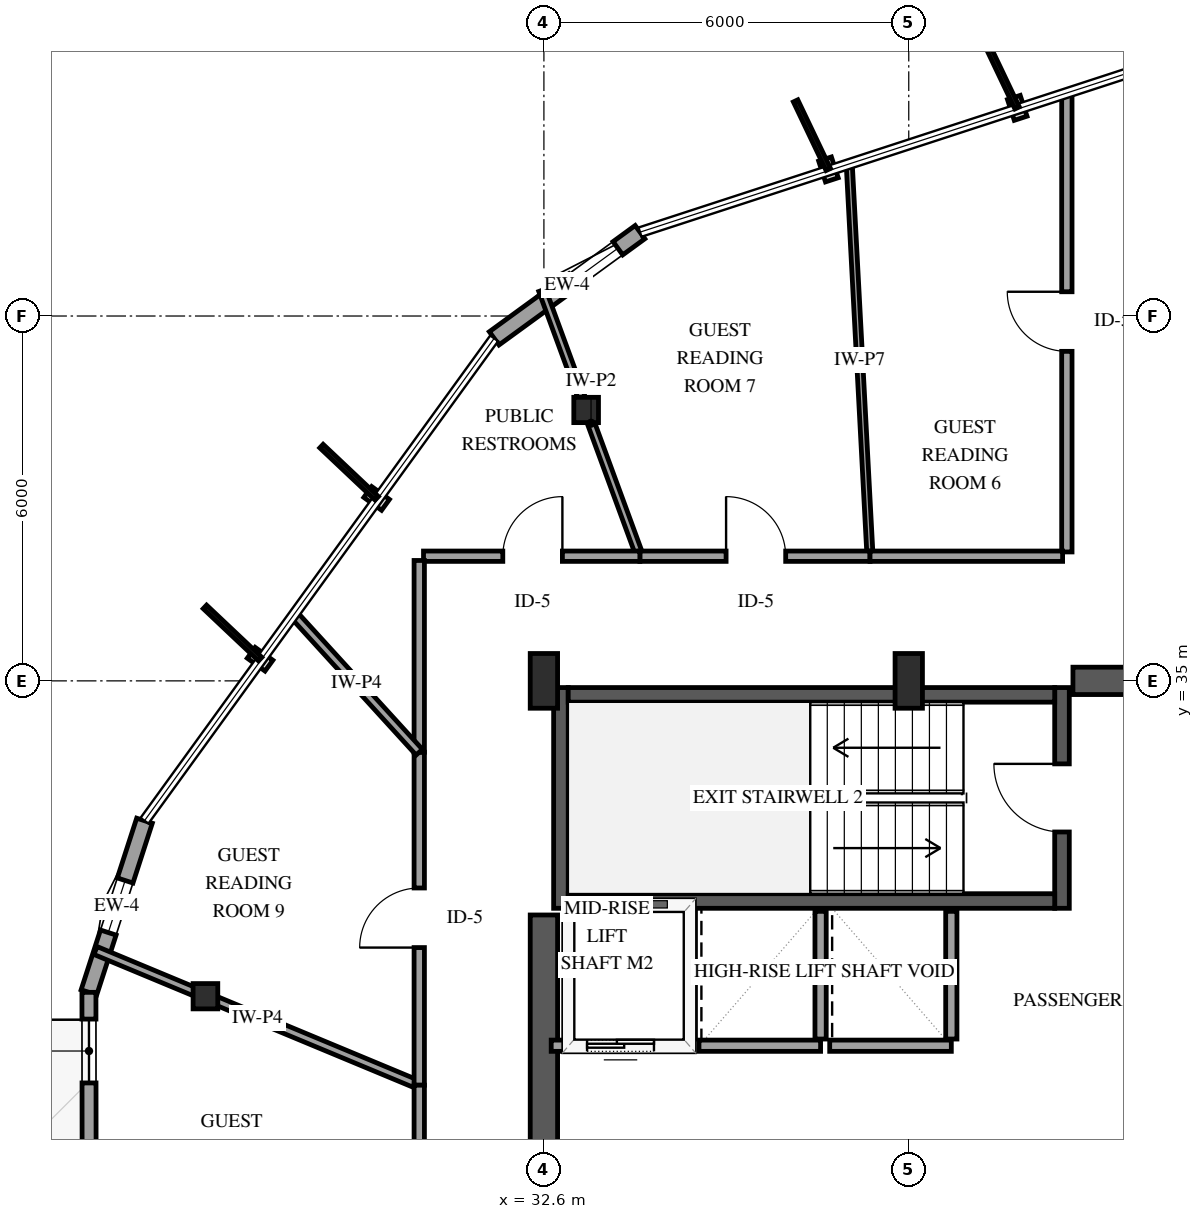
"""IFC4 building model, lengths in metres.
Left out: names, types, materials, properties, quantities, classifications, styles, units other than length and angle.
Written with IfcOpenShell. Run it as: python <this file> out.ifc"""

import sys

from ifc_helpers import new_model, si_unit, direction, frame, frame_2d, origin, origin_2d, place, context, subcontext, project, spatial, rectangle, i_section, extrude, element, fill, save


model = new_model("IFC4")
c1 = context("Model", 3, precision=1e-05, world=origin(), true_north=direction((0.0, 1.0)))
c2 = subcontext(c1, "Body", "Model", "MODEL_VIEW")
j1 = project(units=[si_unit("LENGTHUNIT", "METRE"), si_unit("PLANEANGLEUNIT", "RADIAN")], contexts=[c1])
p1 = place(None, origin())
s1 = spatial("IfcSite", under=j1, at=p1, CompositionType="ELEMENT")
p2 = place(p1, origin())
s2 = spatial("IfcBuilding", under=s1, at=p2, CompositionType="ELEMENT")
p3 = place(p2, frame((0.0, 0.0, 230.2)))
s3 = spatial("IfcBuildingStorey", under=s2, at=p3, CompositionType="ELEMENT", Elevation=230.2)
p4 = place(p3, frame((32.88, 31.26, 0.0), z_axis=(0.0, 0.0, 1.0), x_axis=(0.0, 1.0, 0.0)))
e1 = element("IfcWall", 1, at=p4, inside=s3, PredefinedType="SHEAR", context=c2, shape_type="SweptSolid", body=[
    extrude(rectangle(XDim=3.63, YDim=0.24, at=frame_2d((1.815, 0.0))), origin(), (0.0, 0.0, 1.0), 3.6),
])
p5 = place(p3, frame((41.12, 31.26, 0.0), z_axis=(0.0, 0.0, 1.0), x_axis=(0.0, 1.0, 0.0)))
e2 = element("IfcWall", 2, at=p5, inside=s3, PredefinedType="SHEAR", context=c2, shape_type="SweptSolid", body=[
    extrude(rectangle(XDim=3.63, YDim=0.24, at=frame_2d((1.815, 0.0))), origin(), (0.0, 0.0, 1.0), 3.6),
])
p6 = place(p5, frame((1.255, 0.0, 0.0)))
e3 = element("IfcOpeningElement", 3, at=p6, cuts=e2, PredefinedType="OPENING", context=c2, shape_type="SweptSolid", body=[
    extrude(rectangle(XDim=1.12, YDim=2.15, at=frame_2d((0.56, 1.075))), frame((0.0, 0.13, 0.0), z_axis=(0.0, -1.0, 0.0), x_axis=(1.0, 0.0, 0.0)), (0.0, 0.0, 1.0), 0.26),
])
for number, where, z_axis, x_axis in (
    (4, (33.0, 31.38, 0.0), (0.0, 0.0, 1.0), (1.0, 0.0, 0.0)),
    (5, (33.0, 34.77, 0.0), (0.0, 0.0, 1.0), (1.0, 0.0, 0.0)),
):
    element("IfcWall", number, at=place(p3, frame(where, z_axis=z_axis, x_axis=x_axis)), inside=s3, PredefinedType="SHEAR", context=c2, shape_type="SweptSolid", body=[
        extrude(rectangle(XDim=8.0, YDim=0.24, at=frame_2d((4.0, 0.0))), origin(), (0.0, 0.0, 1.0), 3.6),
    ])
p7 = place(p3, frame((32.6, 18.85, 0.0), z_axis=(0.0, 0.0, 1.0), x_axis=(0.0, 1.0, 0.0)))
e6 = element("IfcWall", 6, at=p7, inside=s3, PredefinedType="SHEAR", context=c2, shape_type="SweptSolid", body=[
    extrude(rectangle(XDim=12.3, YDim=0.45, at=frame_2d((6.15, 0.0))), origin(), (0.0, 0.0, 1.0), 3.6),
])
p8 = place(p3, frame((41.3, 35.0, 0.0), z_axis=(0.0, 0.0, 1.0), x_axis=(1.0, 0.0, 0.0)))
e7 = element("IfcWall", 7, at=p8, inside=s3, PredefinedType="SHEAR", context=c2, shape_type="SweptSolid", body=[
    extrude(rectangle(XDim=2.85, YDim=0.45, at=frame_2d((1.425, 0.0))), origin(), (0.0, 0.0, 1.0), 3.6),
])
for number, where, z_axis, x_axis in (
    (8, (32.6, 35.0, 0.0), (0.0, 0.0, 1.0), (1.0, 0.0, 0.0)),
    (9, (38.6, 35.0, 0.0), (0.0, 0.0, 1.0), (1.0, 0.0, 0.0)),
):
    element("IfcColumn", number, at=place(p3, frame(where, z_axis=z_axis, x_axis=x_axis)), inside=s3, PredefinedType="PILASTER", context=c2, shape_type="SweptSolid", body=[
        extrude(rectangle(XDim=0.45, YDim=0.9, at=origin_2d()), origin(), (0.0, 0.0, 1.0), 3.6),
    ])
for number, where, z_axis, x_axis in (
    (10, (33.295, 39.455, 0.0), (0.0, 0.0, 1.0), (1.0, 0.0, 0.0)),
    (11, (27.034, 29.814, 0.0), (0.0, 0.0, 1.0), (1.0, 0.0, 0.0)),
):
    element("IfcColumn", number, at=place(p3, frame(where, z_axis=z_axis, x_axis=x_axis)), inside=s3, PredefinedType="COLUMN", context=c2, shape_type="SweptSolid", body=[
        extrude(i_section(OverallWidth=0.406, OverallDepth=0.416, WebThickness=0.03, FlangeThickness=0.048, FilletRadius=0.038, at=origin_2d()), origin(), (0.0, 0.0, 1.0), 3.6),
    ])
p9 = place(p3, frame((34.18, 42.379, 0.0), z_axis=(0.0, 0.0, 1.0), x_axis=(-0.808383627719, -0.58865602047, 0.0)))
e12 = element("IfcWall", 12, at=p9, inside=s3, PredefinedType="SOLIDWALL", context=c2, shape_type="SweptSolid", body=[
    extrude(rectangle(XDim=2.967, YDim=0.27, at=frame_2d((1.483, 0.0))), origin(), (0.0, 0.0, 1.0), 2.679),
])
p10 = place(p9, frame((0.45, 0.0, 0.75)))
e13 = element("IfcOpeningElement", 13, at=p10, cuts=e12, PredefinedType="OPENING", context=c2, shape_type="SweptSolid", body=[
    extrude(rectangle(XDim=0.9, YDim=1.5, at=frame_2d((0.45, 0.75))), frame((0.0, 0.145, 0.0), z_axis=(0.0, -1.0, 0.0), x_axis=(1.0, 0.0, 0.0)), (0.0, 0.0, 1.0), 0.29),
])
p11 = place(p3, frame((26.031, 32.7, 0.0), z_axis=(0.0, 0.0, 1.0), x_axis=(-0.307945174151, -0.95140410432, 0.0)))
e14 = element("IfcWall", 14, at=p11, inside=s3, PredefinedType="SOLIDWALL", context=c2, shape_type="SweptSolid", body=[
    extrude(rectangle(XDim=2.967, YDim=0.27, at=frame_2d((1.483, 0.0))), origin(), (0.0, 0.0, 1.0), 2.679),
])
p12 = place(p11, frame((1.033, 0.0, 0.75)))
e15 = element("IfcOpeningElement", 15, at=p12, cuts=e14, PredefinedType="OPENING", context=c2, shape_type="SweptSolid", body=[
    extrude(rectangle(XDim=0.9, YDim=1.5, at=frame_2d((0.45, 0.75))), frame((0.0, 0.145, 0.0), z_axis=(0.0, -1.0, 0.0), x_axis=(1.0, 0.0, 0.0)), (0.0, 0.0, 1.0), 0.29),
])
p13 = place(p3, frame((25.118, 29.878, 0.0), z_axis=(0.0, 0.0, 1.0), x_axis=(0.001046571902, -0.999999452343, 0.0)))
e16 = element("IfcWall", 16, at=p13, inside=s3, PredefinedType="SOLIDWALL", context=c2, shape_type="SweptSolid", body=[
    extrude(rectangle(XDim=9.798, YDim=0.23, at=frame_2d((4.899, 0.0))), origin(), (0.0, 0.0, 1.0), 2.679),
])
p14 = place(p13, frame((4.399, 0.0, 0.0)))
e17 = element("IfcOpeningElement", 17, at=p14, cuts=e16, PredefinedType="OPENING", context=c2, shape_type="SweptSolid", body=[
    extrude(rectangle(XDim=1.0, YDim=2.15, at=frame_2d((0.5, 1.075))), frame((0.0, 0.125, 0.0), z_axis=(0.0, -1.0, 0.0), x_axis=(1.0, 0.0, 0.0)), (0.0, 0.0, 1.0), 0.25),
])
p15 = place(p13, frame((0.44, 0.0, 0.72)))
e18 = element("IfcOpeningElement", 18, at=p15, cuts=e16, PredefinedType="OPENING", context=c2, shape_type="SweptSolid", body=[
    extrude(rectangle(XDim=1.05, YDim=1.55, at=frame_2d((0.525, 0.775))), frame((0.0, 0.125, 0.0), z_axis=(0.0, -1.0, 0.0), x_axis=(1.0, 0.0, 0.0)), (0.0, 0.0, 1.0), 0.25),
])
p16 = place(p13, frame((6.606, 0.0, 0.72)))
e19 = element("IfcOpeningElement", 19, at=p16, cuts=e16, PredefinedType="OPENING", context=c2, shape_type="SweptSolid", body=[
    extrude(rectangle(XDim=1.05, YDim=1.55, at=frame_2d((0.525, 0.775))), frame((0.0, 0.125, 0.0), z_axis=(0.0, -1.0, 0.0), x_axis=(1.0, 0.0, 0.0)), (0.0, 0.0, 1.0), 0.25),
])
p17 = place(p3, frame((32.72, 29.0, 0.0), z_axis=(0.0, 0.0, 1.0), x_axis=(1.0, 0.0, 0.0)))
e20 = element("IfcWall", 20, at=p17, inside=s3, PredefinedType="SOLIDWALL", context=c2, shape_type="SweptSolid", body=[
    extrude(rectangle(XDim=2.28, YDim=0.185, at=frame_2d((1.14, 0.0))), origin(), (0.0, 0.0, 1.0), 3.3),
])
p18 = place(p17, frame((0.59, 0.0, 0.0)))
e21 = element("IfcOpeningElement", 21, at=p18, cuts=e20, PredefinedType="OPENING", context=c2, shape_type="SweptSolid", body=[
    extrude(rectangle(XDim=1.1, YDim=2.15, at=frame_2d((0.55, 1.075))), frame((0.0, 0.103, 0.0), z_axis=(0.0, -1.0, 0.0), x_axis=(1.0, 0.0, 0.0)), (0.0, 0.0, 1.0), 0.205),
])
p19 = place(p3, frame((35.0, 29.11, 0.0), z_axis=(0.0, 0.0, 1.0), x_axis=(0.0, 1.0, 0.0)))
e22 = element("IfcWall", 22, at=p19, inside=s3, PredefinedType="SOLIDWALL", context=c2, shape_type="SweptSolid", body=[
    extrude(rectangle(XDim=2.1, YDim=0.185, at=frame_2d((1.05, 0.0))), origin(), (0.0, 0.0, 1.0), 3.3),
])
p20 = place(p3, frame((35.15, 29.0, 0.0), z_axis=(0.0, 0.0, 1.0), x_axis=(1.0, 0.0, 0.0)))
e23 = element("IfcWall", 23, at=p20, inside=s3, PredefinedType="SOLIDWALL", context=c2, shape_type="SweptSolid", body=[
    extrude(rectangle(XDim=2.0, YDim=0.185, at=frame_2d((1.0, 0.0))), origin(), (0.0, 0.0, 1.0), 3.3),
])
p21 = place(p3, frame((37.15, 29.11, 0.0), z_axis=(0.0, 0.0, 1.0), x_axis=(0.0, 1.0, 0.0)))
e24 = element("IfcWall", 24, at=p21, inside=s3, PredefinedType="SOLIDWALL", context=c2, shape_type="SweptSolid", body=[
    extrude(rectangle(XDim=2.1, YDim=0.185, at=frame_2d((1.05, 0.0))), origin(), (0.0, 0.0, 1.0), 3.3),
])
p22 = place(p3, frame((37.3, 29.0, 0.0), z_axis=(0.0, 0.0, 1.0), x_axis=(1.0, 0.0, 0.0)))
e25 = element("IfcWall", 25, at=p22, inside=s3, PredefinedType="SOLIDWALL", context=c2, shape_type="SweptSolid", body=[
    extrude(rectangle(XDim=2.0, YDim=0.185, at=frame_2d((1.0, 0.0))), origin(), (0.0, 0.0, 1.0), 3.3),
])
p23 = place(p3, frame((39.3, 29.11, 0.0), z_axis=(0.0, 0.0, 1.0), x_axis=(0.0, 1.0, 0.0)))
e26 = element("IfcWall", 26, at=p23, inside=s3, PredefinedType="SOLIDWALL", context=c2, shape_type="SweptSolid", body=[
    extrude(rectangle(XDim=2.1, YDim=0.185, at=frame_2d((1.05, 0.0))), origin(), (0.0, 0.0, 1.0), 3.3),
])
p24 = place(p3, frame((41.2, 37.12, 0.0), z_axis=(0.0, 0.0, 1.0), x_axis=(0.0, 1.0, 0.0)))
e27 = element("IfcWall", 27, at=p24, inside=s3, PredefinedType="PARTITIONING", context=c2, shape_type="SweptSolid", body=[
    extrude(rectangle(XDim=7.548, YDim=0.17, at=frame_2d((3.774, 0.0))), origin(), (0.0, 0.0, 1.0), 3.3),
])
p25 = place(p24, frame((3.299, 0.0, 0.0)))
e28 = element("IfcOpeningElement", 28, at=p25, cuts=e27, PredefinedType="OPENING", context=c2, shape_type="SweptSolid", body=[
    extrude(rectangle(XDim=0.98, YDim=2.15, at=frame_2d((0.49, 1.075))), frame((0.0, 0.095, 0.0), z_axis=(0.0, -1.0, 0.0), x_axis=(1.0, 0.0, 0.0)), (0.0, 0.0, 1.0), 0.19),
])
p26 = place(p3, frame((37.963, 37.05, 0.0), z_axis=(0.0, 0.0, 1.0), x_axis=(-0.052909927122, 0.99859928881, 0.0)))
e29 = element("IfcWall", 29, at=p26, inside=s3, PredefinedType="PARTITIONING", context=c2, shape_type="SweptSolid", body=[
    extrude(rectangle(XDim=6.46, YDim=0.1, at=frame_2d((3.23, 0.0))), origin(), (0.0, 0.0, 1.0), 3.3),
])
p27 = place(p3, frame((30.55, 28.351, 0.0), z_axis=(0.0, 0.0, 1.0), x_axis=(-0.923290981213, 0.384101241875, 0.0)))
e30 = element("IfcWall", 30, at=p27, inside=s3, PredefinedType="PARTITIONING", context=c2, shape_type="SweptSolid", body=[
    extrude(rectangle(XDim=5.766, YDim=0.14, at=frame_2d((2.883, 0.0))), origin(), (0.0, 0.0, 1.0), 3.3),
])
p28 = place(p3, frame((30.55, 28.351, 0.0), z_axis=(0.0, 0.0, 1.0), x_axis=(0.0, 1.0, 0.0)))
e31 = element("IfcWall", 31, at=p28, inside=s3, PredefinedType="PARTITIONING", context=c2, shape_type="SweptSolid", body=[
    extrude(rectangle(XDim=5.476, YDim=0.17, at=frame_2d((2.738, 0.0))), origin(), (0.0, 0.0, 1.0), 3.3),
])
p29 = place(p28, frame((2.263, 0.0, 0.0)))
e32 = element("IfcOpeningElement", 32, at=p29, cuts=e31, PredefinedType="OPENING", context=c2, shape_type="SweptSolid", body=[
    extrude(rectangle(XDim=0.98, YDim=2.15, at=frame_2d((0.49, 1.075))), frame((0.0, 0.095, 0.0), z_axis=(0.0, -1.0, 0.0), x_axis=(1.0, 0.0, 0.0)), (0.0, 0.0, 1.0), 0.19),
])
p30 = place(p3, frame((34.178, 37.05, 0.0), z_axis=(0.0, 0.0, 1.0), x_axis=(-0.34466105816, 0.938727199451, 0.0)))
e33 = element("IfcWall", 33, at=p30, inside=s3, PredefinedType="PARTITIONING", context=c2, shape_type="SweptSolid", body=[
    extrude(rectangle(XDim=4.659, YDim=0.12, at=frame_2d((2.33, 0.0))), origin(), (0.0, 0.0, 1.0), 2.595),
])
p31 = place(p3, frame((30.55, 24.159, 0.0), z_axis=(0.0, 0.0, 1.0), x_axis=(0.0, 1.0, 0.0)))
e34 = element("IfcWall", 34, at=p31, inside=s3, PredefinedType="PARTITIONING", context=c2, shape_type="SweptSolid", body=[
    extrude(rectangle(XDim=4.192, YDim=0.17, at=frame_2d((2.096, 0.0))), origin(), (0.0, 0.0, 1.0), 3.3),
])
p32 = place(p31, frame((1.621, 0.0, 0.0)))
e35 = element("IfcOpeningElement", 35, at=p32, cuts=e34, PredefinedType="OPENING", context=c2, shape_type="SweptSolid", body=[
    extrude(rectangle(XDim=0.98, YDim=2.15, at=frame_2d((0.49, 1.075))), frame((0.0, 0.095, 0.0), z_axis=(0.0, -1.0, 0.0), x_axis=(1.0, 0.0, 0.0)), (0.0, 0.0, 1.0), 0.19),
])
p33 = place(p3, frame((34.178, 37.05, 0.0), z_axis=(0.0, 0.0, 1.0), x_axis=(1.0, 0.0, 0.0)))
e36 = element("IfcWall", 36, at=p33, inside=s3, PredefinedType="PARTITIONING", context=c2, shape_type="SweptSolid", body=[
    extrude(rectangle(XDim=3.785, YDim=0.17, at=frame_2d((1.893, 0.0))), origin(), (0.0, 0.0, 1.0), 3.3),
])
p34 = place(p33, frame((1.418, 0.0, 0.0)))
e37 = element("IfcOpeningElement", 37, at=p34, cuts=e36, PredefinedType="OPENING", context=c2, shape_type="SweptSolid", body=[
    extrude(rectangle(XDim=0.98, YDim=2.15, at=frame_2d((0.49, 1.075))), frame((0.0, 0.095, 0.0), z_axis=(0.0, -1.0, 0.0), x_axis=(1.0, 0.0, 0.0)), (0.0, 0.0, 1.0), 0.19),
])
p35 = place(p3, frame((30.62, 37.05, 0.0), z_axis=(0.0, 0.0, 1.0), x_axis=(1.0, 0.0, 0.0)))
e38 = element("IfcWall", 38, at=p35, inside=s3, PredefinedType="PARTITIONING", context=c2, shape_type="SweptSolid", body=[
    extrude(rectangle(XDim=3.558, YDim=0.17, at=frame_2d((1.779, 0.0))), origin(), (0.0, 0.0, 1.0), 3.3),
])
p36 = place(p35, frame((1.304, 0.0, 0.0)))
e39 = element("IfcOpeningElement", 39, at=p36, cuts=e38, PredefinedType="OPENING", context=c2, shape_type="SweptSolid", body=[
    extrude(rectangle(XDim=0.98, YDim=2.15, at=frame_2d((0.49, 1.075))), frame((0.0, 0.095, 0.0), z_axis=(0.0, -1.0, 0.0), x_axis=(1.0, 0.0, 0.0)), (0.0, 0.0, 1.0), 0.19),
])
p37 = place(p3, frame((37.963, 37.05, 0.0), z_axis=(0.0, 0.0, 1.0), x_axis=(1.0, 0.0, 0.0)))
e40 = element("IfcWall", 40, at=p37, inside=s3, PredefinedType="PARTITIONING", context=c2, shape_type="SweptSolid", body=[
    extrude(rectangle(XDim=3.167, YDim=0.17, at=frame_2d((1.583, 0.0))), origin(), (0.0, 0.0, 1.0), 3.3),
])
p38 = place(p3, frame((30.55, 33.827, 0.0), z_axis=(0.0, 0.0, 1.0), x_axis=(0.0, 1.0, 0.0)))
e41 = element("IfcWall", 41, at=p38, inside=s3, PredefinedType="PARTITIONING", context=c2, shape_type="SweptSolid", body=[
    extrude(rectangle(XDim=3.153, YDim=0.17, at=frame_2d((1.577, 0.0))), origin(), (0.0, 0.0, 1.0), 3.3),
])
p39 = place(p3, frame((30.55, 33.827, 0.0), z_axis=(0.0, 0.0, 1.0), x_axis=(-0.673847391002, 0.738870552695, 0.0)))
e42 = element("IfcWall", 42, at=p39, inside=s3, PredefinedType="PARTITIONING", context=c2, shape_type="SweptSolid", body=[
    extrude(rectangle(XDim=3.06, YDim=0.14, at=frame_2d((1.53, 0.0))), origin(), (0.0, 0.0, 1.0), 3.3),
])
p40 = place(p10, origin())
e43 = element("IfcWindow", 43, at=p40, inside=s3, PartitioningType="SINGLE_PANEL", PredefinedType="WINDOW", context=c2, shape_type="SweptSolid", body=[
    extrude(rectangle(XDim=0.9, YDim=1.5, at=frame_2d((0.45, 0.75))), frame((0.0, 0.03, 0.0), z_axis=(0.0, -1.0, 0.0), x_axis=(1.0, 0.0, 0.0)), (0.0, 0.0, 1.0), 0.06),
])
fill(e13, e43)
p41 = place(p12, origin())
e44 = element("IfcWindow", 44, at=p41, inside=s3, PartitioningType="SINGLE_PANEL", PredefinedType="WINDOW", context=c2, shape_type="SweptSolid", body=[
    extrude(rectangle(XDim=0.9, YDim=1.5, at=frame_2d((0.45, 0.75))), frame((0.0, 0.03, 0.0), z_axis=(0.0, -1.0, 0.0), x_axis=(1.0, 0.0, 0.0)), (0.0, 0.0, 1.0), 0.06),
])
fill(e15, e44)
p42 = place(p15, origin())
e45 = element("IfcWindow", 45, at=p42, inside=s3, PartitioningType="SINGLE_PANEL", PredefinedType="WINDOW", context=c2, shape_type="SweptSolid", body=[
    extrude(rectangle(XDim=1.05, YDim=1.55, at=frame_2d((0.525, 0.775))), frame((0.0, 0.03, 0.0), z_axis=(0.0, -1.0, 0.0), x_axis=(1.0, 0.0, 0.0)), (0.0, 0.0, 1.0), 0.06),
])
fill(e18, e45)
p43 = place(p18, origin())
e46 = element("IfcDoor", 46, at=p43, inside=s3, OperationType="SLIDING_TO_LEFT", PredefinedType="DOOR", context=c2, shape_type="SweptSolid", body=[
    extrude(rectangle(XDim=1.1, YDim=2.15, at=frame_2d((0.55, 1.075))), frame((0.0, 0.025, 0.0), z_axis=(0.0, -1.0, 0.0), x_axis=(1.0, 0.0, 0.0)), (0.0, 0.0, 1.0), 0.05),
])
fill(e21, e46)
p44 = place(p6, origin())
e47 = element("IfcDoor", 47, at=p44, inside=s3, OperationType="SINGLE_SWING_RIGHT", PredefinedType="DOOR", context=c2, shape_type="SweptSolid", body=[
    extrude(rectangle(XDim=1.12, YDim=2.15, at=frame_2d((0.56, 1.075))), frame((0.0, 0.025, 0.0), z_axis=(0.0, -1.0, 0.0), x_axis=(1.0, 0.0, 0.0)), (0.0, 0.0, 1.0), 0.05),
])
fill(e3, e47)
p45 = place(p25, origin())
e48 = element("IfcDoor", 48, at=p45, inside=s3, OperationType="SINGLE_SWING_RIGHT", PredefinedType="DOOR", context=c2, shape_type="SweptSolid", body=[
    extrude(rectangle(XDim=0.98, YDim=2.15, at=frame_2d((0.49, 1.075))), frame((0.0, 0.025, 0.0), z_axis=(0.0, -1.0, 0.0), x_axis=(1.0, 0.0, 0.0)), (0.0, 0.0, 1.0), 0.05),
])
fill(e28, e48)
p46 = place(p29, origin())
e49 = element("IfcDoor", 49, at=p46, inside=s3, OperationType="SINGLE_SWING_LEFT", PredefinedType="DOOR", context=c2, shape_type="SweptSolid", body=[
    extrude(rectangle(XDim=0.98, YDim=2.15, at=frame_2d((0.49, 1.075))), frame((0.0, 0.025, 0.0), z_axis=(0.0, -1.0, 0.0), x_axis=(1.0, 0.0, 0.0)), (0.0, 0.0, 1.0), 0.05),
])
fill(e32, e49)
p47 = place(p34, origin())
e50 = element("IfcDoor", 50, at=p47, inside=s3, OperationType="SINGLE_SWING_LEFT", PredefinedType="DOOR", context=c2, shape_type="SweptSolid", body=[
    extrude(rectangle(XDim=0.98, YDim=2.15, at=frame_2d((0.49, 1.075))), frame((0.0, 0.025, 0.0), z_axis=(0.0, -1.0, 0.0), x_axis=(1.0, 0.0, 0.0)), (0.0, 0.0, 1.0), 0.05),
])
fill(e37, e50)
p48 = place(p36, origin())
e51 = element("IfcDoor", 51, at=p48, inside=s3, OperationType="SINGLE_SWING_RIGHT", PredefinedType="DOOR", context=c2, shape_type="SweptSolid", body=[
    extrude(rectangle(XDim=0.98, YDim=2.15, at=frame_2d((0.49, 1.075))), frame((0.0, 0.025, 0.0), z_axis=(0.0, -1.0, 0.0), x_axis=(1.0, 0.0, 0.0)), (0.0, 0.0, 1.0), 0.05),
])
fill(e39, e51)
save(model, sys.argv[1])
